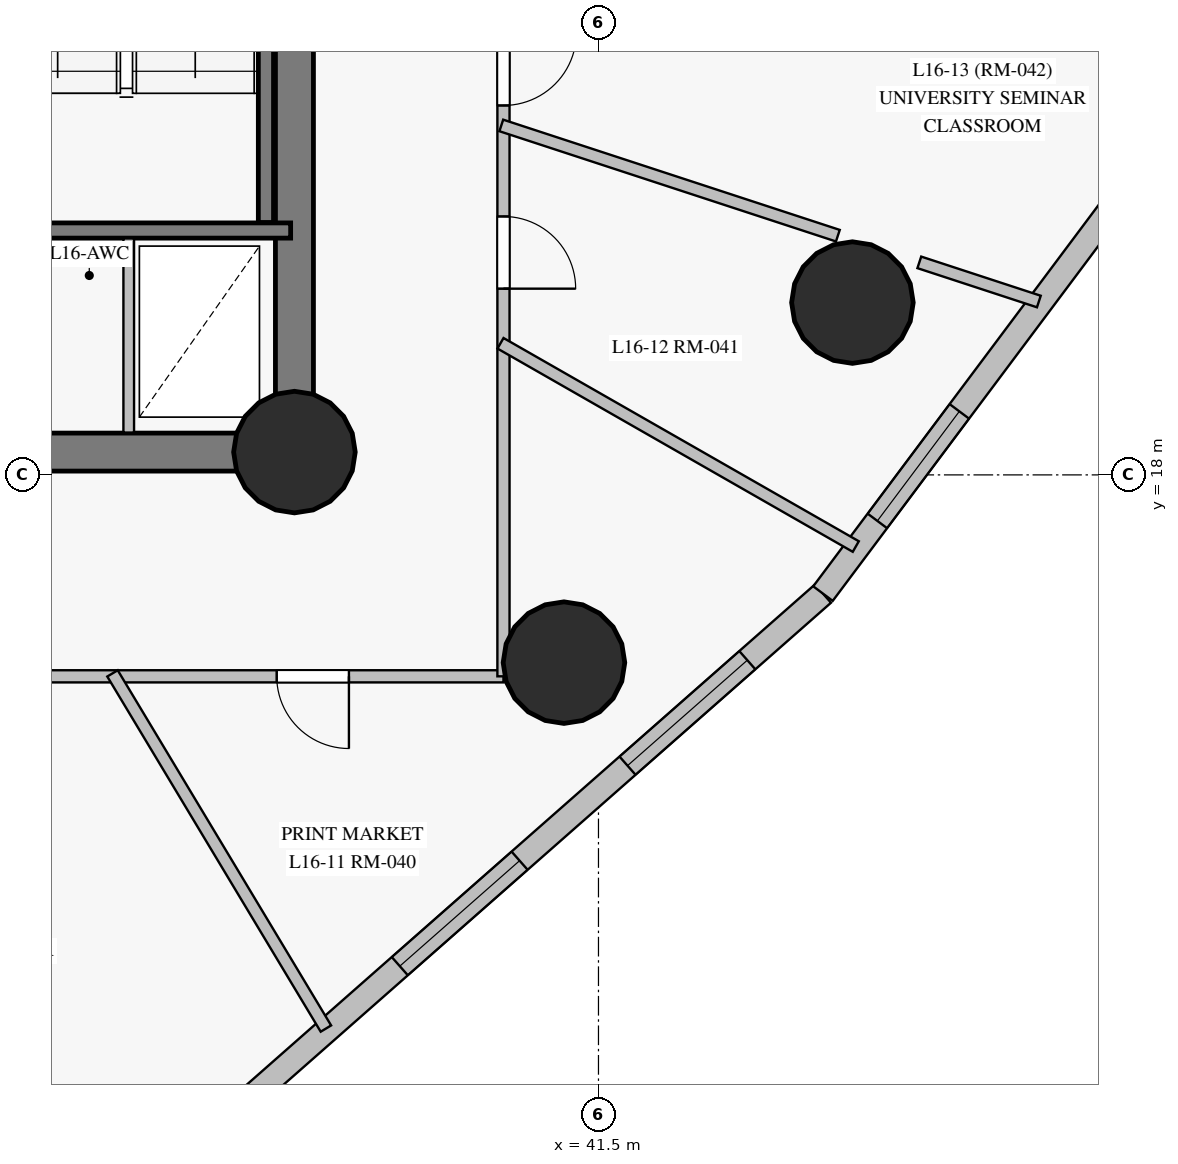
"""IFC4 building model, lengths in metres.
Left out: names, types, materials, properties, quantities, classifications, styles, units other than length and angle.
Written with IfcOpenShell. Run it as: python <this file> out.ifc"""

import sys

from ifc_helpers import new_model, si_unit, direction, frame, frame_2d, origin, origin_with_axes, origin_2d, place, context, subcontext, project, spatial, rectangle, circle, extrude, source, transform, mapped, element, fill, save


model = new_model("IFC4")
c1 = context("Model", 3, precision=1e-05, world=origin(), true_north=direction((0.0, 1.0)))
c2 = subcontext(c1, "Body", "Model", "MODEL_VIEW")
j1 = project(units=[si_unit("LENGTHUNIT", "METRE"), si_unit("PLANEANGLEUNIT", "RADIAN")], contexts=[c1])
p1 = place(None, origin())
s1 = spatial("IfcSite", under=j1, at=p1, CompositionType="ELEMENT")
p2 = place(p1, origin())
s2 = spatial("IfcBuilding", under=s1, at=p2, CompositionType="ELEMENT")
p3 = place(p2, frame((0.0, 0.0, 62.5)))
s3 = spatial("IfcBuildingStorey", under=s2, at=p3, CompositionType="ELEMENT", Elevation=62.5)
p4 = place(p3, frame((26.55, 18.3, 0.0), z_axis=(0.0, 0.0, 1.0), x_axis=(1.0, 0.0, 0.0)))
e1 = element("IfcWall", 1, at=p4, inside=s3, PredefinedType="SHEAR", context=c2, shape_type="SweptSolid", body=[
    extrude(rectangle(XDim=10.95, YDim=0.5, at=frame_2d((5.475, 0.0))), origin(), (0.0, 0.0, 1.0), 3.35),
])
p5 = place(p4, frame((4.55, 0.0, 0.0)))
e2 = element("IfcOpeningElement", 2, at=p5, cuts=e1, PredefinedType="OPENING", context=c2, shape_type="SweptSolid", body=[
    extrude(rectangle(XDim=1.4, YDim=2.2, at=frame_2d((0.7, 1.1))), frame((0.0, 0.26, 0.0), z_axis=(0.0, -1.0, 0.0), x_axis=(1.0, 0.0, 0.0)), (0.0, 0.0, 1.0), 0.52),
])
p6 = place(p3, frame((37.5, 18.3, 0.0), z_axis=(0.0, 0.0, 1.0), x_axis=(0.0, 1.0, 0.0)))
e3 = element("IfcWall", 3, at=p6, inside=s3, PredefinedType="SHEAR", context=c2, shape_type="SweptSolid", body=[
    extrude(rectangle(XDim=16.4, YDim=0.5, at=frame_2d((8.2, 0.0))), origin(), (0.0, 0.0, 1.0), 3.35),
])
p7 = place(p6, frame((14.06, 0.0, 0.0)))
e4 = element("IfcOpeningElement", 4, at=p7, cuts=e3, PredefinedType="OPENING", context=c2, shape_type="SweptSolid", body=[
    extrude(rectangle(XDim=1.2, YDim=2.15, at=frame_2d((0.6, 1.075))), frame((0.0, 0.26, 0.0), z_axis=(0.0, -1.0, 0.0), x_axis=(1.0, 0.0, 0.0)), (0.0, 0.0, 1.0), 0.52),
])
m1 = source(origin_with_axes(), c2, "Body", "SweptSolid", [
    extrude(circle(Radius=0.8, at=origin_2d()), origin(), (0.0, 0.0, 1.0), 3.6),
])
for number, where, z_axis, x_axis in (
    (5, (37.5, 18.3, 0.0), (0.0, 0.0, 1.0), (1.0, 0.0, 0.0)),
    (6, (44.841, 20.267, 0.0), (0.0, 0.0, 1.0), (1.0, 0.0, 0.0)),
    (7, (41.046, 15.53, 0.0), (0.0, 0.0, 1.0), (1.0, 0.0, 0.0)),
):
    element("IfcColumn", number, at=place(p3, frame(where, z_axis=z_axis, x_axis=x_axis)), inside=s3, PredefinedType="COLUMN", context=c2, shape_type="MappedRepresentation", body=[
        mapped(m1, transform((0.0, 0.0, 0.0), scale=1.0)),
    ])
p8 = place(p3, frame((36.459, 9.4, 0.0), z_axis=(0.0, 0.0, 1.0), x_axis=(0.750582546648, 0.660776695009, 0.0)))
e8 = element("IfcWall", 8, at=p8, inside=s3, PredefinedType="SOLIDWALL", context=c2, shape_type="SweptSolid", body=[
    extrude(rectangle(XDim=10.651, YDim=0.32, at=frame_2d((5.326, 0.0))), origin(), (0.0, 0.0, 1.0), 3.35),
])
p9 = place(p8, frame((3.234, 0.0, 0.85)))
e9 = element("IfcOpeningElement", 9, at=p9, cuts=e8, PredefinedType="OPENING", context=c2, shape_type="SweptSolid", body=[
    extrude(rectangle(XDim=2.1, YDim=1.95, at=frame_2d((1.05, 0.975))), frame((0.0, 0.17, 0.0), z_axis=(0.0, -1.0, 0.0), x_axis=(1.0, 0.0, 0.0)), (0.0, 0.0, 1.0), 0.34),
])
p10 = place(p8, frame((7.225, 0.0, 0.85)))
e10 = element("IfcOpeningElement", 10, at=p10, cuts=e8, PredefinedType="OPENING", context=c2, shape_type="SweptSolid", body=[
    extrude(rectangle(XDim=2.1, YDim=1.95, at=frame_2d((1.05, 0.975))), frame((0.0, 0.17, 0.0), z_axis=(0.0, -1.0, 0.0), x_axis=(1.0, 0.0, 0.0)), (0.0, 0.0, 1.0), 0.34),
])
p11 = place(p3, frame((44.454, 16.438, 0.0), z_axis=(0.0, 0.0, 1.0), x_axis=(0.599150494903, 0.800636424638, 0.0)))
e11 = element("IfcWall", 11, at=p11, inside=s3, PredefinedType="SOLIDWALL", context=c2, shape_type="SweptSolid", body=[
    extrude(rectangle(XDim=15.318, YDim=0.32, at=frame_2d((7.659, 0.0))), origin(), (0.0, 0.0, 1.0), 3.35),
])
p12 = place(p11, frame((1.194, 0.0, 0.85)))
e12 = element("IfcOpeningElement", 12, at=p12, cuts=e11, PredefinedType="OPENING", context=c2, shape_type="SweptSolid", body=[
    extrude(rectangle(XDim=1.8, YDim=1.85, at=frame_2d((0.9, 0.925))), frame((0.0, 0.17, 0.0), z_axis=(0.0, -1.0, 0.0), x_axis=(1.0, 0.0, 0.0)), (0.0, 0.0, 1.0), 0.34),
])
p13 = place(p11, frame((13.171, 0.0, 0.85)))
e13 = element("IfcOpeningElement", 13, at=p13, cuts=e11, PredefinedType="OPENING", context=c2, shape_type="SweptSolid", body=[
    extrude(rectangle(XDim=1.5, YDim=1.85, at=frame_2d((0.75, 0.925))), frame((0.0, 0.17, 0.0), z_axis=(0.0, -1.0, 0.0), x_axis=(1.0, 0.0, 0.0)), (0.0, 0.0, 1.0), 0.34),
])
p14 = place(p3, frame((37.125, 21.32, 0.0), z_axis=(0.0, 0.0, 1.0), x_axis=(0.0, 1.0, 0.0)))
e14 = element("IfcWall", 14, at=p14, inside=s3, PredefinedType="SHEAR", context=c2, shape_type="SweptSolid", body=[
    extrude(rectangle(XDim=7.5, YDim=0.2, at=frame_2d((3.75, 0.0))), origin(), (0.0, 0.0, 1.0), 3.35),
])
p15 = place(p3, frame((33.455, 21.215, 0.0), z_axis=(0.0, 0.0, 1.0), x_axis=(1.0, 0.0, 0.0)))
e15 = element("IfcWall", 15, at=p15, inside=s3, PredefinedType="SHEAR", context=c2, shape_type="SweptSolid", body=[
    extrude(rectangle(XDim=3.995, YDim=0.2, at=frame_2d((1.998, 0.0))), origin(), (0.0, 0.0, 1.0), 3.35),
])
p16 = place(p3, frame((40.25, 15.35, 0.0), z_axis=(0.0, 0.0, 1.0), x_axis=(-1.0, 0.0, 0.0)))
e16 = element("IfcWall", 16, at=p16, inside=s3, PredefinedType="PARTITIONING", context=c2, shape_type="SweptSolid", body=[
    extrude(rectangle(XDim=29.75, YDim=0.16, at=frame_2d((14.875, 0.0))), origin(), (0.0, 0.0, 1.0), 2.7),
])
p17 = place(p16, frame((27.263, 0.0, 0.0)))
e17 = element("IfcOpeningElement", 17, at=p17, cuts=e16, PredefinedType="OPENING", context=c2, shape_type="SweptSolid", body=[
    extrude(rectangle(XDim=0.96, YDim=2.15, at=frame_2d((0.48, 1.075))), frame((0.0, 0.09, 0.0), z_axis=(0.0, -1.0, 0.0), x_axis=(1.0, 0.0, 0.0)), (0.0, 0.0, 1.0), 0.18),
])
p18 = place(p16, frame((22.778, 0.0, 0.0)))
e18 = element("IfcOpeningElement", 18, at=p18, cuts=e16, PredefinedType="OPENING", context=c2, shape_type="SweptSolid", body=[
    extrude(rectangle(XDim=0.95, YDim=2.15, at=frame_2d((0.475, 1.075))), frame((0.0, 0.09, 0.0), z_axis=(0.0, -1.0, 0.0), x_axis=(1.0, 0.0, 0.0)), (0.0, 0.0, 1.0), 0.18),
])
p19 = place(p16, frame((14.4, 0.0, 0.0)))
e19 = element("IfcOpeningElement", 19, at=p19, cuts=e16, PredefinedType="OPENING", context=c2, shape_type="SweptSolid", body=[
    extrude(rectangle(XDim=0.96, YDim=2.15, at=frame_2d((0.48, 1.075))), frame((0.0, 0.09, 0.0), z_axis=(0.0, -1.0, 0.0), x_axis=(1.0, 0.0, 0.0)), (0.0, 0.0, 1.0), 0.18),
])
p20 = place(p16, frame((9.938, 0.0, 0.0)))
e20 = element("IfcOpeningElement", 20, at=p20, cuts=e16, PredefinedType="OPENING", context=c2, shape_type="SweptSolid", body=[
    extrude(rectangle(XDim=0.96, YDim=2.15, at=frame_2d((0.48, 1.075))), frame((0.0, 0.09, 0.0), z_axis=(0.0, -1.0, 0.0), x_axis=(1.0, 0.0, 0.0)), (0.0, 0.0, 1.0), 0.18),
])
p21 = place(p16, frame((2.033, 0.0, 0.0)))
e21 = element("IfcOpeningElement", 21, at=p21, cuts=e16, PredefinedType="OPENING", context=c2, shape_type="SweptSolid", body=[
    extrude(rectangle(XDim=0.95, YDim=2.15, at=frame_2d((0.475, 1.075))), frame((0.0, 0.09, 0.0), z_axis=(0.0, -1.0, 0.0), x_axis=(1.0, 0.0, 0.0)), (0.0, 0.0, 1.0), 0.18),
])
p22 = place(p3, frame((40.25, 37.65, 0.0), z_axis=(0.0, 0.0, 1.0), x_axis=(0.0, -1.0, 0.0)))
e22 = element("IfcWall", 22, at=p22, inside=s3, PredefinedType="PARTITIONING", context=c2, shape_type="SweptSolid", body=[
    extrude(rectangle(XDim=22.3, YDim=0.16, at=frame_2d((11.15, 0.0))), origin(), (0.0, 0.0, 1.0), 2.75),
])
p23 = place(p22, frame((16.25, 0.0, 0.0)))
e23 = element("IfcOpeningElement", 23, at=p23, cuts=e22, PredefinedType="OPENING", context=c2, shape_type="SweptSolid", body=[
    extrude(rectangle(XDim=0.95, YDim=2.15, at=frame_2d((0.475, 1.075))), frame((0.0, 0.09, 0.0), z_axis=(0.0, -1.0, 0.0), x_axis=(1.0, 0.0, 0.0)), (0.0, 0.0, 1.0), 0.18),
])
p24 = place(p22, frame((13.83, 0.0, 0.0)))
e24 = element("IfcOpeningElement", 24, at=p24, cuts=e22, PredefinedType="OPENING", context=c2, shape_type="SweptSolid", body=[
    extrude(rectangle(XDim=0.96, YDim=2.15, at=frame_2d((0.48, 1.075))), frame((0.0, 0.09, 0.0), z_axis=(0.0, -1.0, 0.0), x_axis=(1.0, 0.0, 0.0)), (0.0, 0.0, 1.0), 0.18),
])
p25 = place(p22, frame((10.385, 0.0, 0.0)))
e25 = element("IfcOpeningElement", 25, at=p25, cuts=e22, PredefinedType="OPENING", context=c2, shape_type="SweptSolid", body=[
    extrude(rectangle(XDim=0.95, YDim=2.15, at=frame_2d((0.475, 1.075))), frame((0.0, 0.09, 0.0), z_axis=(0.0, -1.0, 0.0), x_axis=(1.0, 0.0, 0.0)), (0.0, 0.0, 1.0), 0.18),
])
p26 = place(p3, frame((35.106, 15.389, 0.0), z_axis=(0.0, 0.0, 1.0), x_axis=(0.515022535582, -0.857176637481, 0.0)))
e26 = element("IfcWall", 26, at=p26, inside=s3, PredefinedType="PARTITIONING", context=c2, shape_type="SweptSolid", body=[
    extrude(rectangle(XDim=5.451, YDim=0.16, at=frame_2d((2.726, 0.0))), origin(), (0.0, 0.0, 1.0), 3.35),
])
p27 = place(p3, frame((40.211, 19.731, 0.0), z_axis=(0.0, 0.0, 1.0), x_axis=(0.868019857331, -0.49652948279, 0.0)))
e27 = element("IfcWall", 27, at=p27, inside=s3, PredefinedType="PARTITIONING", context=c2, shape_type="SweptSolid", body=[
    extrude(rectangle(XDim=5.385, YDim=0.16, at=frame_2d((2.692, 0.0))), origin(), (0.0, 0.0, 1.0), 2.7),
])
p28 = place(p3, frame((40.221, 22.597, 0.0), z_axis=(0.0, 0.0, 1.0), x_axis=(0.950315709019, -0.311287733764, 0.0)))
e28 = element("IfcWall", 28, at=p28, inside=s3, PredefinedType="PARTITIONING", context=c2, shape_type="SweptSolid", body=[
    extrude(rectangle(XDim=4.659, YDim=0.16, at=frame_2d((2.33, 0.0))), origin(), (0.0, 0.0, 1.0), 3.35),
])
p29 = place(p3, frame((35.32, 18.557, 0.0), z_axis=(0.0, 0.0, 1.0), x_axis=(0.0, 1.0, 0.0)))
e29 = element("IfcWall", 29, at=p29, inside=s3, PredefinedType="PARTITIONING", context=c2, shape_type="SweptSolid", body=[
    extrude(rectangle(XDim=2.553, YDim=0.14, at=frame_2d((1.277, 0.0))), origin(), (0.0, 0.0, 1.0), 3.35),
])
p30 = place(p3, frame((45.721, 20.796, 0.0), z_axis=(0.0, 0.0, 1.0), x_axis=(0.950366200592, -0.311133548129, 0.0)))
e30 = element("IfcWall", 30, at=p30, inside=s3, PredefinedType="PARTITIONING", context=c2, shape_type="SweptSolid", body=[
    extrude(rectangle(XDim=1.655, YDim=0.16, at=frame_2d((0.827, 0.0))), origin(), (0.0, 0.0, 1.0), 3.35),
])
m2 = source(origin_with_axes(), c2, "Body", "SweptSolid", [
    extrude(rectangle(XDim=2.1, YDim=1.95, at=frame_2d((1.05, 0.975))), frame((0.0, 0.03, 0.0), z_axis=(0.0, -1.0, 0.0), x_axis=(1.0, 0.0, 0.0)), (0.0, 0.0, 1.0), 0.06),
])
p31 = place(p9, origin())
e31 = element("IfcWindow", 31, at=p31, inside=s3, PartitioningType="SINGLE_PANEL", PredefinedType="WINDOW", context=c2, shape_type="MappedRepresentation", body=[
    mapped(m2, transform((0.0, 0.0, 0.0), scale=1.0)),
])
fill(e9, e31)
p32 = place(p10, origin())
e32 = element("IfcWindow", 32, at=p32, inside=s3, PartitioningType="SINGLE_PANEL", PredefinedType="WINDOW", context=c2, shape_type="MappedRepresentation", body=[
    mapped(m2, transform((0.0, 0.0, 0.0), scale=1.0)),
])
fill(e10, e32)
m3 = source(origin_with_axes(), c2, "Body", "SweptSolid", [
    extrude(rectangle(XDim=1.8, YDim=1.85, at=frame_2d((0.9, 0.925))), frame((0.0, 0.03, 0.0), z_axis=(0.0, -1.0, 0.0), x_axis=(1.0, 0.0, 0.0)), (0.0, 0.0, 1.0), 0.06),
])
p33 = place(p12, origin())
e33 = element("IfcWindow", 33, at=p33, inside=s3, PartitioningType="SINGLE_PANEL", PredefinedType="WINDOW", context=c2, shape_type="MappedRepresentation", body=[
    mapped(m3, transform((0.0, 0.0, 0.0), scale=1.0)),
])
fill(e12, e33)
m4 = source(origin_with_axes(), c2, "Body", "SweptSolid", [
    extrude(rectangle(XDim=0.95, YDim=2.15, at=frame_2d((0.475, 1.075))), frame((0.0, 0.025, 0.0), z_axis=(0.0, -1.0, 0.0), x_axis=(1.0, 0.0, 0.0)), (0.0, 0.0, 1.0), 0.05),
])
p34 = place(p21, origin())
e34 = element("IfcDoor", 34, at=p34, inside=s3, OperationType="SINGLE_SWING_LEFT", PredefinedType="DOOR", context=c2, shape_type="MappedRepresentation", body=[
    mapped(m4, transform((0.0, 0.0, 0.0), scale=1.0)),
])
fill(e21, e34)
p35 = place(p23, origin())
e35 = element("IfcDoor", 35, at=p35, inside=s3, OperationType="SINGLE_SWING_RIGHT", PredefinedType="DOOR", context=c2, shape_type="MappedRepresentation", body=[
    mapped(m4, transform((0.0, 0.0, 0.0), scale=1.0)),
])
fill(e23, e35)
m5 = source(origin_with_axes(), c2, "Body", "SweptSolid", [
    extrude(rectangle(XDim=0.96, YDim=2.15, at=frame_2d((0.48, 1.075))), frame((0.0, 0.025, 0.0), z_axis=(0.0, -1.0, 0.0), x_axis=(1.0, 0.0, 0.0)), (0.0, 0.0, 1.0), 0.05),
])
p36 = place(p24, origin())
e36 = element("IfcDoor", 36, at=p36, inside=s3, OperationType="SINGLE_SWING_LEFT", PredefinedType="DOOR", context=c2, shape_type="MappedRepresentation", body=[
    mapped(m5, transform((0.0, 0.0, 0.0), scale=1.0)),
])
fill(e24, e36)
save(model, sys.argv[1])
